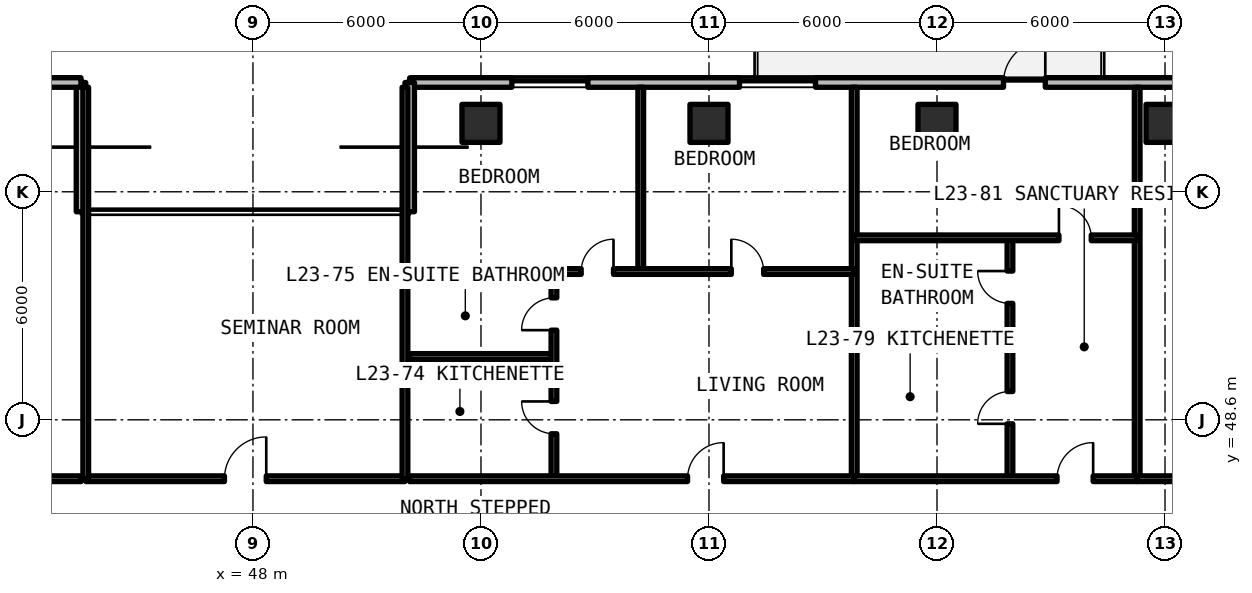
"""IFC4 building model, lengths in metres.
Left out: names, types, materials, properties, quantities, classifications, styles, units other than length and angle.
Written with IfcOpenShell. Run it as: python <this file> out.ifc"""

import sys

from ifc_helpers import new_model, si_unit, direction, frame, frame_2d, origin, origin_2d, place, context, subcontext, project, spatial, rectangle, extrude, element, fill, save


model = new_model("IFC4")
c1 = context("Model", 3, precision=1e-05, world=origin(), true_north=direction((0.0, 1.0)))
c2 = subcontext(c1, "Body", "Model", "MODEL_VIEW")
j1 = project(units=[si_unit("LENGTHUNIT", "METRE"), si_unit("PLANEANGLEUNIT", "RADIAN")], contexts=[c1])
p1 = place(None, origin())
s1 = spatial("IfcSite", under=j1, at=p1, CompositionType="ELEMENT")
p2 = place(p1, origin())
s2 = spatial("IfcBuilding", under=s1, at=p2, CompositionType="ELEMENT")
p3 = place(p2, frame((0.0, 0.0, 85.47)))
s3 = spatial("IfcBuildingStorey", under=s2, at=p3, CompositionType="ELEMENT", Elevation=85.47)
for number, where, z_axis, x_axis in (
    (1, (54.0, 56.4, 0.0), (0.0, 0.0, 1.0), (1.0, 0.0, 0.0)),
    (2, (60.0, 56.4, 0.0), (0.0, 0.0, 1.0), (1.0, 0.0, 0.0)),
    (3, (66.0, 56.4, 0.0), (0.0, 0.0, 1.0), (1.0, 0.0, 0.0)),
    (4, (72.0, 56.4, 0.0), (0.0, 0.0, 1.0), (1.0, 0.0, 0.0)),
):
    element("IfcColumn", number, at=place(p3, frame(where, z_axis=z_axis, x_axis=x_axis)), inside=s3, PredefinedType="COLUMN", context=c2, shape_type="SweptSolid", body=[
        extrude(rectangle(XDim=1.0, YDim=1.0, at=origin_2d()), origin(), (0.0, 0.0, 1.0), 3.3),
    ])
p4 = place(p3, frame((96.148, 57.475, 0.0), z_axis=(0.0, 0.0, 1.0), x_axis=(-1.0, 0.0, 0.0)))
e5 = element("IfcWall", 5, at=p4, inside=s3, PredefinedType="SOLIDWALL", context=c2, shape_type="SweptSolid", body=[
    extrude(rectangle(XDim=44.023, YDim=0.25, at=frame_2d((22.012, 0.0))), origin(), (0.0, 0.0, 1.0), 3.08),
])
p5 = place(p4, frame((27.298, 0.0, 0.0)))
e6 = element("IfcOpeningElement", 6, at=p5, cuts=e5, PredefinedType="OPENING", context=c2, shape_type="SweptSolid", body=[
    extrude(rectangle(XDim=1.1, YDim=2.15, at=frame_2d((0.55, 1.075))), frame((0.0, 0.135, 0.0), z_axis=(0.0, -1.0, 0.0), x_axis=(1.0, 0.0, 0.0)), (0.0, 0.0, 1.0), 0.27),
])
p6 = place(p4, frame((19.948, 0.0, 0.0)))
e7 = element("IfcOpeningElement", 7, at=p6, cuts=e5, PredefinedType="OPENING", context=c2, shape_type="SweptSolid", body=[
    extrude(rectangle(XDim=1.1, YDim=2.15, at=frame_2d((0.55, 1.075))), frame((0.0, 0.135, 0.0), z_axis=(0.0, -1.0, 0.0), x_axis=(1.0, 0.0, 0.0)), (0.0, 0.0, 1.0), 0.27),
])
p7 = place(p4, frame((8.098, 0.0, 0.0)))
e8 = element("IfcOpeningElement", 8, at=p7, cuts=e5, PredefinedType="OPENING", context=c2, shape_type="SweptSolid", body=[
    extrude(rectangle(XDim=1.1, YDim=2.15, at=frame_2d((0.55, 1.075))), frame((0.0, 0.135, 0.0), z_axis=(0.0, -1.0, 0.0), x_axis=(1.0, 0.0, 0.0)), (0.0, 0.0, 1.0), 0.27),
])
p8 = place(p4, frame((39.336, 0.0, 0.78)))
e9 = element("IfcOpeningElement", 9, at=p8, cuts=e5, PredefinedType="OPENING", context=c2, shape_type="SweptSolid", body=[
    extrude(rectangle(XDim=2.0, YDim=1.66, at=frame_2d((1.0, 0.83))), frame((0.0, 0.135, 0.0), z_axis=(0.0, -1.0, 0.0), x_axis=(1.0, 0.0, 0.0)), (0.0, 0.0, 1.0), 0.27),
])
p9 = place(p4, frame((33.345, 0.0, 0.78)))
e10 = element("IfcOpeningElement", 10, at=p9, cuts=e5, PredefinedType="OPENING", context=c2, shape_type="SweptSolid", body=[
    extrude(rectangle(XDim=2.0, YDim=1.66, at=frame_2d((1.0, 0.83))), frame((0.0, 0.135, 0.0), z_axis=(0.0, -1.0, 0.0), x_axis=(1.0, 0.0, 0.0)), (0.0, 0.0, 1.0), 0.27),
])
p10 = place(p4, frame((13.044, 0.0, 0.78)))
e11 = element("IfcOpeningElement", 11, at=p10, cuts=e5, PredefinedType="OPENING", context=c2, shape_type="SweptSolid", body=[
    extrude(rectangle(XDim=1.4, YDim=1.65, at=frame_2d((0.7, 0.825))), frame((0.0, 0.135, 0.0), z_axis=(0.0, -1.0, 0.0), x_axis=(1.0, 0.0, 0.0)), (0.0, 0.0, 1.0), 0.27),
])
p11 = place(p4, frame((2.871, 0.0, 0.78)))
e12 = element("IfcOpeningElement", 12, at=p11, cuts=e5, PredefinedType="OPENING", context=c2, shape_type="SweptSolid", body=[
    extrude(rectangle(XDim=2.0, YDim=1.66, at=frame_2d((1.0, 0.83))), frame((0.0, 0.135, 0.0), z_axis=(0.0, -1.0, 0.0), x_axis=(1.0, 0.0, 0.0)), (0.0, 0.0, 1.0), 0.27),
])
for number, where, z_axis, x_axis in (
    (13, (52.125, 57.475, 0.0), (0.0, 0.0, 1.0), (0.0, -1.0, 0.0)),
    (14, (43.475, 54.075, 0.0), (0.0, 0.0, 1.0), (0.0, 1.0, 0.0)),
):
    element("IfcWall", number, at=place(p3, frame(where, z_axis=z_axis, x_axis=x_axis)), inside=s3, PredefinedType="SOLIDWALL", context=c2, shape_type="SweptSolid", body=[
        extrude(rectangle(XDim=3.4, YDim=0.25, at=frame_2d((1.7, 0.0))), origin(), (0.0, 0.0, 1.0), 3.08),
    ])
p12 = place(p3, frame((43.475, 57.475, 0.0), z_axis=(0.0, 0.0, 1.0), x_axis=(-1.0, 0.0, 0.0)))
e15 = element("IfcWall", 15, at=p12, inside=s3, PredefinedType="SOLIDWALL", context=c2, shape_type="SweptSolid", body=[
    extrude(rectangle(XDim=22.023, YDim=0.25, at=frame_2d((11.012, 0.0))), origin(), (0.0, 0.0, 1.0), 3.08),
])
p13 = place(p12, frame((10.675, 0.0, 0.0)))
e16 = element("IfcOpeningElement", 16, at=p13, cuts=e15, PredefinedType="OPENING", context=c2, shape_type="SweptSolid", body=[
    extrude(rectangle(XDim=1.1, YDim=2.15, at=frame_2d((0.55, 1.075))), frame((0.0, 0.135, 0.0), z_axis=(0.0, -1.0, 0.0), x_axis=(1.0, 0.0, 0.0)), (0.0, 0.0, 1.0), 0.27),
])
p14 = place(p12, frame((16.596, 0.0, 0.78)))
e17 = element("IfcOpeningElement", 17, at=p14, cuts=e15, PredefinedType="OPENING", context=c2, shape_type="SweptSolid", body=[
    extrude(rectangle(XDim=2.0, YDim=1.66, at=frame_2d((1.0, 0.83))), frame((0.0, 0.135, 0.0), z_axis=(0.0, -1.0, 0.0), x_axis=(1.0, 0.0, 0.0)), (0.0, 0.0, 1.0), 0.27),
])
p15 = place(p12, frame((4.403, 0.0, 0.78)))
e18 = element("IfcOpeningElement", 18, at=p15, cuts=e15, PredefinedType="OPENING", context=c2, shape_type="SweptSolid", body=[
    extrude(rectangle(XDim=0.85, YDim=1.65, at=frame_2d((0.425, 0.825))), frame((0.0, 0.135, 0.0), z_axis=(0.0, -1.0, 0.0), x_axis=(1.0, 0.0, 0.0)), (0.0, 0.0, 1.0), 0.27),
])
p16 = place(p12, frame((2.305, 0.0, 0.78)))
e19 = element("IfcOpeningElement", 19, at=p16, cuts=e15, PredefinedType="OPENING", context=c2, shape_type="SweptSolid", body=[
    extrude(rectangle(XDim=0.85, YDim=1.65, at=frame_2d((0.425, 0.825))), frame((0.0, 0.135, 0.0), z_axis=(0.0, -1.0, 0.0), x_axis=(1.0, 0.0, 0.0)), (0.0, 0.0, 1.0), 0.27),
])
p17 = place(p3, frame((43.6, 47.05, 0.0), z_axis=(0.0, 0.0, 1.0), x_axis=(1.0, 0.0, 0.0)))
e20 = element("IfcWall", 20, at=p17, inside=s3, PredefinedType="SOLIDWALL", context=c2, shape_type="SweptSolid", body=[
    extrude(rectangle(XDim=8.4, YDim=0.15, at=frame_2d((4.2, 0.0))), origin(), (0.0, 0.0, 1.0), 2.35),
])
p18 = place(p17, frame((3.65, 0.0, 0.0)))
e21 = element("IfcOpeningElement", 21, at=p18, cuts=e20, PredefinedType="OPENING", context=c2, shape_type="SweptSolid", body=[
    extrude(rectangle(XDim=1.1, YDim=2.15, at=frame_2d((0.55, 1.075))), frame((0.0, 0.085, 0.0), z_axis=(0.0, -1.0, 0.0), x_axis=(1.0, 0.0, 0.0)), (0.0, 0.0, 1.0), 0.17),
])
for number, where, z_axis, x_axis in (
    (22, (43.6, 47.05, 0.0), (0.0, 0.0, 1.0), (0.0, 1.0, 0.0)),
    (23, (52.0, 47.05, 0.0), (0.0, 0.0, 1.0), (0.0, 1.0, 0.0)),
):
    element("IfcWall", number, at=place(p3, frame(where, z_axis=z_axis, x_axis=x_axis)), inside=s3, PredefinedType="SOLIDWALL", context=c2, shape_type="SweptSolid", body=[
        extrude(rectangle(XDim=10.3, YDim=0.15, at=frame_2d((5.15, 0.0))), origin(), (0.0, 0.0, 1.0), 2.35),
    ])
p19 = place(p3, frame((37.646, 47.05, 0.0), z_axis=(0.0, 0.0, 1.0), x_axis=(1.0, 0.0, 0.0)))
e24 = element("IfcWall", 24, at=p19, inside=s3, PredefinedType="SOLIDWALL", context=c2, shape_type="SweptSolid", body=[
    extrude(rectangle(XDim=5.834, YDim=0.15, at=frame_2d((2.917, 0.0))), origin(), (0.0, 0.0, 1.0), 2.35),
])
p20 = place(p19, frame((3.474, 0.0, 0.0)))
e25 = element("IfcOpeningElement", 25, at=p20, cuts=e24, PredefinedType="OPENING", context=c2, shape_type="SweptSolid", body=[
    extrude(rectangle(XDim=0.95, YDim=2.15, at=frame_2d((0.475, 1.075))), frame((0.0, 0.085, 0.0), z_axis=(0.0, -1.0, 0.0), x_axis=(1.0, 0.0, 0.0)), (0.0, 0.0, 1.0), 0.17),
])
p21 = place(p3, frame((63.821, 47.05, 0.0), z_axis=(0.0, 0.0, 1.0), x_axis=(0.0, 1.0, 0.0)))
e26 = element("IfcWall", 26, at=p21, inside=s3, PredefinedType="SOLIDWALL", context=c2, shape_type="SweptSolid", body=[
    extrude(rectangle(XDim=10.3, YDim=0.15, at=frame_2d((5.15, 0.0))), origin(), (0.0, 0.0, 1.0), 2.35),
])
p22 = place(p3, frame((52.12, 50.267, 0.0), z_axis=(0.0, 0.0, 1.0), x_axis=(1.0, 0.0, 0.0)))
e27 = element("IfcWall", 27, at=p22, inside=s3, PredefinedType="PARTITIONING", context=c2, shape_type="SweptSolid", body=[
    extrude(rectangle(XDim=3.8, YDim=0.15, at=frame_2d((1.9, 0.0))), origin(), (0.0, 0.0, 1.0), 2.35),
])
p23 = place(p3, frame((55.92, 47.05, 0.0), z_axis=(0.0, 0.0, 1.0), x_axis=(0.0, 1.0, 0.0)))
e28 = element("IfcWall", 28, at=p23, inside=s3, PredefinedType="PARTITIONING", context=c2, shape_type="SweptSolid", body=[
    extrude(rectangle(XDim=5.452, YDim=0.15, at=frame_2d((2.726, 0.0))), origin(), (0.0, 0.0, 1.0), 2.35),
])
p24 = place(p23, frame((1.183, 0.0, 0.0)))
e29 = element("IfcOpeningElement", 29, at=p24, cuts=e28, PredefinedType="OPENING", context=c2, shape_type="SweptSolid", body=[
    extrude(rectangle(XDim=0.85, YDim=2.1, at=frame_2d((0.425, 1.05))), frame((0.0, 0.085, 0.0), z_axis=(0.0, -1.0, 0.0), x_axis=(1.0, 0.0, 0.0)), (0.0, 0.0, 1.0), 0.17),
])
p25 = place(p23, frame((3.909, 0.0, 0.0)))
e30 = element("IfcOpeningElement", 30, at=p25, cuts=e28, PredefinedType="OPENING", context=c2, shape_type="SweptSolid", body=[
    extrude(rectangle(XDim=0.85, YDim=2.1, at=frame_2d((0.425, 1.05))), frame((0.0, 0.085, 0.0), z_axis=(0.0, -1.0, 0.0), x_axis=(1.0, 0.0, 0.0)), (0.0, 0.0, 1.0), 0.17),
])
p26 = place(p3, frame((58.205, 52.502, 0.0), z_axis=(0.0, 0.0, 1.0), x_axis=(0.0, 1.0, 0.0)))
e31 = element("IfcWall", 31, at=p26, inside=s3, PredefinedType="PARTITIONING", context=c2, shape_type="SweptSolid", body=[
    extrude(rectangle(XDim=4.848, YDim=0.15, at=frame_2d((2.424, 0.0))), origin(), (0.0, 0.0, 1.0), 2.35),
])
p27 = place(p3, frame((52.12, 52.502, 0.0), z_axis=(0.0, 0.0, 1.0), x_axis=(1.0, 0.0, 0.0)))
e32 = element("IfcWall", 32, at=p27, inside=s3, PredefinedType="PARTITIONING", context=c2, shape_type="SweptSolid", body=[
    extrude(rectangle(XDim=11.701, YDim=0.15, at=frame_2d((5.851, 0.0))), origin(), (0.0, 0.0, 1.0), 2.35),
])
p28 = place(p27, frame((4.517, 0.0, 0.0)))
e33 = element("IfcOpeningElement", 33, at=p28, cuts=e32, PredefinedType="OPENING", context=c2, shape_type="SweptSolid", body=[
    extrude(rectangle(XDim=0.85, YDim=2.1, at=frame_2d((0.425, 1.05))), frame((0.0, 0.085, 0.0), z_axis=(0.0, -1.0, 0.0), x_axis=(1.0, 0.0, 0.0)), (0.0, 0.0, 1.0), 0.17),
])
p29 = place(p27, frame((8.468, 0.0, 0.0)))
e34 = element("IfcOpeningElement", 34, at=p29, cuts=e32, PredefinedType="OPENING", context=c2, shape_type="SweptSolid", body=[
    extrude(rectangle(XDim=0.85, YDim=2.1, at=frame_2d((0.425, 1.05))), frame((0.0, 0.085, 0.0), z_axis=(0.0, -1.0, 0.0), x_axis=(1.0, 0.0, 0.0)), (0.0, 0.0, 1.0), 0.17),
])
p30 = place(p3, frame((52.12, 47.05, 0.0), z_axis=(0.0, 0.0, 1.0), x_axis=(1.0, 0.0, 0.0)))
e35 = element("IfcWall", 35, at=p30, inside=s3, PredefinedType="SOLIDWALL", context=c2, shape_type="SweptSolid", body=[
    extrude(rectangle(XDim=11.701, YDim=0.15, at=frame_2d((5.851, 0.0))), origin(), (0.0, 0.0, 1.0), 2.35),
])
p31 = place(p30, frame((7.316, 0.0, 0.0)))
e36 = element("IfcOpeningElement", 36, at=p31, cuts=e35, PredefinedType="OPENING", context=c2, shape_type="SweptSolid", body=[
    extrude(rectangle(XDim=0.95, YDim=2.15, at=frame_2d((0.475, 1.075))), frame((0.0, 0.085, 0.0), z_axis=(0.0, -1.0, 0.0), x_axis=(1.0, 0.0, 0.0)), (0.0, 0.0, 1.0), 0.17),
])
p32 = place(p3, frame((71.268, 47.05, 0.0), z_axis=(0.0, 0.0, 1.0), x_axis=(0.0, 1.0, 0.0)))
e37 = element("IfcWall", 37, at=p32, inside=s3, PredefinedType="SOLIDWALL", context=c2, shape_type="SweptSolid", body=[
    extrude(rectangle(XDim=10.3, YDim=0.15, at=frame_2d((5.15, 0.0))), origin(), (0.0, 0.0, 1.0), 2.35),
])
p33 = place(p3, frame((63.821, 50.79, 0.0), z_axis=(0.0, 0.0, 1.0), x_axis=(1.0, 0.0, 0.0)))
e38 = element("IfcWall", 38, at=p33, inside=s3, PredefinedType="PARTITIONING", context=c2, shape_type="SweptSolid", body=[
    extrude(rectangle(XDim=4.099, YDim=0.15, at=frame_2d((2.049, 0.0))), origin(), (0.0, 0.0, 1.0), 2.35),
])
p34 = place(p3, frame((67.92, 47.05, 0.0), z_axis=(0.0, 0.0, 1.0), x_axis=(0.0, 1.0, 0.0)))
e39 = element("IfcWall", 39, at=p34, inside=s3, PredefinedType="PARTITIONING", context=c2, shape_type="SweptSolid", body=[
    extrude(rectangle(XDim=6.338, YDim=0.15, at=frame_2d((3.169, 0.0))), origin(), (0.0, 0.0, 1.0), 2.35),
])
p35 = place(p34, frame((1.445, 0.0, 0.0)))
e40 = element("IfcOpeningElement", 40, at=p35, cuts=e39, PredefinedType="OPENING", context=c2, shape_type="SweptSolid", body=[
    extrude(rectangle(XDim=0.85, YDim=2.1, at=frame_2d((0.425, 1.05))), frame((0.0, 0.085, 0.0), z_axis=(0.0, -1.0, 0.0), x_axis=(1.0, 0.0, 0.0)), (0.0, 0.0, 1.0), 0.17),
])
p36 = place(p34, frame((4.614, 0.0, 0.0)))
e41 = element("IfcOpeningElement", 41, at=p36, cuts=e39, PredefinedType="OPENING", context=c2, shape_type="SweptSolid", body=[
    extrude(rectangle(XDim=0.85, YDim=2.1, at=frame_2d((0.425, 1.05))), frame((0.0, 0.085, 0.0), z_axis=(0.0, -1.0, 0.0), x_axis=(1.0, 0.0, 0.0)), (0.0, 0.0, 1.0), 0.17),
])
p37 = place(p3, frame((63.821, 53.388, 0.0), z_axis=(0.0, 0.0, 1.0), x_axis=(1.0, 0.0, 0.0)))
e42 = element("IfcWall", 42, at=p37, inside=s3, PredefinedType="PARTITIONING", context=c2, shape_type="SweptSolid", body=[
    extrude(rectangle(XDim=7.446, YDim=0.15, at=frame_2d((3.723, 0.0))), origin(), (0.0, 0.0, 1.0), 2.35),
])
p38 = place(p37, frame((5.387, 0.0, 0.0)))
e43 = element("IfcOpeningElement", 43, at=p38, cuts=e42, PredefinedType="OPENING", context=c2, shape_type="SweptSolid", body=[
    extrude(rectangle(XDim=0.85, YDim=2.1, at=frame_2d((0.425, 1.05))), frame((0.0, 0.085, 0.0), z_axis=(0.0, -1.0, 0.0), x_axis=(1.0, 0.0, 0.0)), (0.0, 0.0, 1.0), 0.17),
])
p39 = place(p3, frame((63.821, 47.05, 0.0), z_axis=(0.0, 0.0, 1.0), x_axis=(1.0, 0.0, 0.0)))
e44 = element("IfcWall", 44, at=p39, inside=s3, PredefinedType="SOLIDWALL", context=c2, shape_type="SweptSolid", body=[
    extrude(rectangle(XDim=7.446, YDim=0.15, at=frame_2d((3.723, 0.0))), origin(), (0.0, 0.0, 1.0), 2.35),
])
p40 = place(p39, frame((5.337, 0.0, 0.0)))
e45 = element("IfcOpeningElement", 45, at=p40, cuts=e44, PredefinedType="OPENING", context=c2, shape_type="SweptSolid", body=[
    extrude(rectangle(XDim=0.95, YDim=2.15, at=frame_2d((0.475, 1.075))), frame((0.0, 0.085, 0.0), z_axis=(0.0, -1.0, 0.0), x_axis=(1.0, 0.0, 0.0)), (0.0, 0.0, 1.0), 0.17),
])
p41 = place(p3, frame((71.268, 47.05, 0.0), z_axis=(0.0, 0.0, 1.0), x_axis=(1.0, 0.0, 0.0)))
e46 = element("IfcWall", 46, at=p41, inside=s3, PredefinedType="SOLIDWALL", context=c2, shape_type="SweptSolid", body=[
    extrude(rectangle(XDim=9.84, YDim=0.15, at=frame_2d((4.92, 0.0))), origin(), (0.0, 0.0, 1.0), 2.35),
])
p42 = place(p41, frame((4.37, 0.0, 0.0)))
e47 = element("IfcOpeningElement", 47, at=p42, cuts=e46, PredefinedType="OPENING", context=c2, shape_type="SweptSolid", body=[
    extrude(rectangle(XDim=1.1, YDim=2.15, at=frame_2d((0.55, 1.075))), frame((0.0, 0.085, 0.0), z_axis=(0.0, -1.0, 0.0), x_axis=(1.0, 0.0, 0.0)), (0.0, 0.0, 1.0), 0.17),
])
p43 = place(p5, frame((1.1, 0.0, 0.0), z_axis=(0.0, 0.0, 1.0), x_axis=(-1.0, 0.0, 0.0)))
e48 = element("IfcDoor", 48, at=p43, inside=s3, OperationType="SINGLE_SWING_LEFT", PredefinedType="DOOR", context=c2, shape_type="SweptSolid", body=[
    extrude(rectangle(XDim=1.1, YDim=2.15, at=frame_2d((0.55, 1.075))), frame((0.0, 0.025, 0.0), z_axis=(0.0, -1.0, 0.0), x_axis=(1.0, 0.0, 0.0)), (0.0, 0.0, 1.0), 0.05),
])
fill(e6, e48)
p44 = place(p8, origin())
e49 = element("IfcWindow", 49, at=p44, inside=s3, PartitioningType="SINGLE_PANEL", PredefinedType="WINDOW", context=c2, shape_type="SweptSolid", body=[
    extrude(rectangle(XDim=2.0, YDim=1.66, at=frame_2d((1.0, 0.83))), frame((0.0, 0.03, 0.0), z_axis=(0.0, -1.0, 0.0), x_axis=(1.0, 0.0, 0.0)), (0.0, 0.0, 1.0), 0.06),
])
fill(e9, e49)
p45 = place(p9, origin())
e50 = element("IfcWindow", 50, at=p45, inside=s3, PartitioningType="SINGLE_PANEL", PredefinedType="WINDOW", context=c2, shape_type="SweptSolid", body=[
    extrude(rectangle(XDim=2.0, YDim=1.66, at=frame_2d((1.0, 0.83))), frame((0.0, 0.03, 0.0), z_axis=(0.0, -1.0, 0.0), x_axis=(1.0, 0.0, 0.0)), (0.0, 0.0, 1.0), 0.06),
])
fill(e10, e50)
p46 = place(p18, origin())
e51 = element("IfcDoor", 51, at=p46, inside=s3, OperationType="SINGLE_SWING_RIGHT", PredefinedType="DOOR", context=c2, shape_type="SweptSolid", body=[
    extrude(rectangle(XDim=1.1, YDim=2.15, at=frame_2d((0.55, 1.075))), frame((0.0, 0.025, 0.0), z_axis=(0.0, -1.0, 0.0), x_axis=(1.0, 0.0, 0.0)), (0.0, 0.0, 1.0), 0.05),
])
fill(e21, e51)
p47 = place(p24, origin())
e52 = element("IfcDoor", 52, at=p47, inside=s3, OperationType="SINGLE_SWING_RIGHT", PredefinedType="DOOR", context=c2, shape_type="SweptSolid", body=[
    extrude(rectangle(XDim=0.85, YDim=2.1, at=frame_2d((0.425, 1.05))), frame((0.0, 0.025, 0.0), z_axis=(0.0, -1.0, 0.0), x_axis=(1.0, 0.0, 0.0)), (0.0, 0.0, 1.0), 0.05),
])
fill(e29, e52)
p48 = place(p25, origin())
e53 = element("IfcDoor", 53, at=p48, inside=s3, OperationType="SINGLE_SWING_LEFT", PredefinedType="DOOR", context=c2, shape_type="SweptSolid", body=[
    extrude(rectangle(XDim=0.85, YDim=2.1, at=frame_2d((0.425, 1.05))), frame((0.0, 0.025, 0.0), z_axis=(0.0, -1.0, 0.0), x_axis=(1.0, 0.0, 0.0)), (0.0, 0.0, 1.0), 0.05),
])
fill(e30, e53)
p49 = place(p28, origin())
e54 = element("IfcDoor", 54, at=p49, inside=s3, OperationType="SINGLE_SWING_RIGHT", PredefinedType="DOOR", context=c2, shape_type="SweptSolid", body=[
    extrude(rectangle(XDim=0.85, YDim=2.1, at=frame_2d((0.425, 1.05))), frame((0.0, 0.025, 0.0), z_axis=(0.0, -1.0, 0.0), x_axis=(1.0, 0.0, 0.0)), (0.0, 0.0, 1.0), 0.05),
])
fill(e33, e54)
p50 = place(p29, origin())
e55 = element("IfcDoor", 55, at=p50, inside=s3, OperationType="SINGLE_SWING_LEFT", PredefinedType="DOOR", context=c2, shape_type="SweptSolid", body=[
    extrude(rectangle(XDim=0.85, YDim=2.1, at=frame_2d((0.425, 1.05))), frame((0.0, 0.025, 0.0), z_axis=(0.0, -1.0, 0.0), x_axis=(1.0, 0.0, 0.0)), (0.0, 0.0, 1.0), 0.05),
])
fill(e34, e55)
p51 = place(p31, origin())
e56 = element("IfcDoor", 56, at=p51, inside=s3, OperationType="SINGLE_SWING_RIGHT", PredefinedType="DOOR", context=c2, shape_type="SweptSolid", body=[
    extrude(rectangle(XDim=0.95, YDim=2.15, at=frame_2d((0.475, 1.075))), frame((0.0, 0.025, 0.0), z_axis=(0.0, -1.0, 0.0), x_axis=(1.0, 0.0, 0.0)), (0.0, 0.0, 1.0), 0.05),
])
fill(e36, e56)
p52 = place(p35, origin())
e57 = element("IfcDoor", 57, at=p52, inside=s3, OperationType="SINGLE_SWING_LEFT", PredefinedType="DOOR", context=c2, shape_type="SweptSolid", body=[
    extrude(rectangle(XDim=0.85, YDim=2.1, at=frame_2d((0.425, 1.05))), frame((0.0, 0.025, 0.0), z_axis=(0.0, -1.0, 0.0), x_axis=(1.0, 0.0, 0.0)), (0.0, 0.0, 1.0), 0.05),
])
fill(e40, e57)
p53 = place(p36, origin())
e58 = element("IfcDoor", 58, at=p53, inside=s3, OperationType="SINGLE_SWING_RIGHT", PredefinedType="DOOR", context=c2, shape_type="SweptSolid", body=[
    extrude(rectangle(XDim=0.85, YDim=2.1, at=frame_2d((0.425, 1.05))), frame((0.0, 0.025, 0.0), z_axis=(0.0, -1.0, 0.0), x_axis=(1.0, 0.0, 0.0)), (0.0, 0.0, 1.0), 0.05),
])
fill(e41, e58)
p54 = place(p38, origin())
e59 = element("IfcDoor", 59, at=p54, inside=s3, OperationType="SINGLE_SWING_LEFT", PredefinedType="DOOR", context=c2, shape_type="SweptSolid", body=[
    extrude(rectangle(XDim=0.85, YDim=2.1, at=frame_2d((0.425, 1.05))), frame((0.0, 0.025, 0.0), z_axis=(0.0, -1.0, 0.0), x_axis=(1.0, 0.0, 0.0)), (0.0, 0.0, 1.0), 0.05),
])
fill(e43, e59)
p55 = place(p40, origin())
e60 = element("IfcDoor", 60, at=p55, inside=s3, OperationType="SINGLE_SWING_RIGHT", PredefinedType="DOOR", context=c2, shape_type="SweptSolid", body=[
    extrude(rectangle(XDim=0.95, YDim=2.15, at=frame_2d((0.475, 1.075))), frame((0.0, 0.025, 0.0), z_axis=(0.0, -1.0, 0.0), x_axis=(1.0, 0.0, 0.0)), (0.0, 0.0, 1.0), 0.05),
])
fill(e45, e60)
save(model, sys.argv[1])
